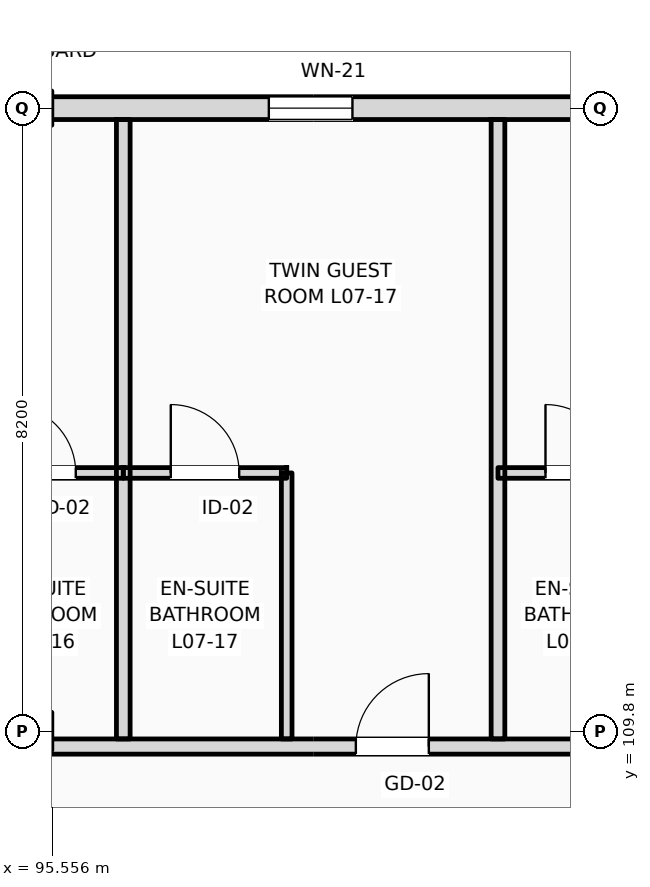
"""IFC4 building model, lengths in metres.
Left out: names, types, materials, properties, quantities, classifications, styles, units other than length and angle.
Written with IfcOpenShell. Run it as: python <this file> out.ifc"""

import sys

from ifc_helpers import new_model, si_unit, direction, frame, frame_2d, origin, place, context, subcontext, project, spatial, rectangle, extrude, element, fill, save


model = new_model("IFC4")
c1 = context("Model", 3, precision=1e-05, world=origin(), true_north=direction((0.0, 1.0)))
c2 = subcontext(c1, "Body", "Model", "MODEL_VIEW")
j1 = project(units=[si_unit("LENGTHUNIT", "METRE"), si_unit("PLANEANGLEUNIT", "RADIAN")], contexts=[c1])
p1 = place(None, origin())
s1 = spatial("IfcSite", under=j1, at=p1, CompositionType="ELEMENT")
p2 = place(p1, origin())
s2 = spatial("IfcBuilding", under=s1, at=p2, CompositionType="ELEMENT")
p3 = place(p2, frame((0.0, 0.0, 31.8)))
s3 = spatial("IfcBuildingStorey", under=s2, at=p3, CompositionType="ELEMENT", Elevation=31.8)
p4 = place(p3, frame((22.5, 118.0, 0.0), z_axis=(0.0, 0.0, 1.0), x_axis=(1.0, 0.0, 0.0)))
e1 = element("IfcWall", 1, at=p4, inside=s3, PredefinedType="STANDARD", context=c2, shape_type="SweptSolid", body=[
    extrude(rectangle(XDim=97.5, YDim=0.3, at=frame_2d((48.75, 0.0))), origin(), (0.0, 0.0, 1.0), 2.72),
])
p5 = place(p4, frame((3.61, 0.0, 0.9)))
e2 = element("IfcOpeningElement", 2, at=p5, cuts=e1, PredefinedType="OPENING", context=c2, shape_type="SweptSolid", body=[
    extrude(rectangle(XDim=1.1, YDim=1.64, at=frame_2d((0.55, 0.82))), frame((0.0, 0.16, 0.0), z_axis=(0.0, -1.0, 0.0), x_axis=(1.0, 0.0, 0.0)), (0.0, 0.0, 1.0), 0.32),
])
p6 = place(p4, frame((6.855, 0.0, 0.0)))
e3 = element("IfcOpeningElement", 3, at=p6, cuts=e1, PredefinedType="OPENING", context=c2, shape_type="SweptSolid", body=[
    extrude(rectangle(XDim=1.2, YDim=2.25, at=frame_2d((0.6, 1.125))), frame((0.0, 0.16, 0.0), z_axis=(0.0, -1.0, 0.0), x_axis=(1.0, 0.0, 0.0)), (0.0, 0.0, 1.0), 0.32),
])
p7 = place(p4, frame((11.405, 0.0, 0.9)))
e4 = element("IfcOpeningElement", 4, at=p7, cuts=e1, PredefinedType="OPENING", context=c2, shape_type="SweptSolid", body=[
    extrude(rectangle(XDim=2.1, YDim=1.64, at=frame_2d((1.05, 0.82))), frame((0.0, 0.16, 0.0), z_axis=(0.0, -1.0, 0.0), x_axis=(1.0, 0.0, 0.0)), (0.0, 0.0, 1.0), 0.32),
])
p8 = place(p4, frame((15.13, 0.0, 0.9)))
e5 = element("IfcOpeningElement", 5, at=p8, cuts=e1, PredefinedType="OPENING", context=c2, shape_type="SweptSolid", body=[
    extrude(rectangle(XDim=2.25, YDim=1.64, at=frame_2d((1.125, 0.82))), frame((0.0, 0.16, 0.0), z_axis=(0.0, -1.0, 0.0), x_axis=(1.0, 0.0, 0.0)), (0.0, 0.0, 1.0), 0.32),
])
p9 = place(p4, frame((21.53, 0.0, 0.0)))
e6 = element("IfcOpeningElement", 6, at=p9, cuts=e1, PredefinedType="OPENING", context=c2, shape_type="SweptSolid", body=[
    extrude(rectangle(XDim=1.2, YDim=2.25, at=frame_2d((0.6, 1.125))), frame((0.0, 0.16, 0.0), z_axis=(0.0, -1.0, 0.0), x_axis=(1.0, 0.0, 0.0)), (0.0, 0.0, 1.0), 0.32),
])
p10 = place(p4, frame((24.18, 0.0, 0.9)))
e7 = element("IfcOpeningElement", 7, at=p10, cuts=e1, PredefinedType="OPENING", context=c2, shape_type="SweptSolid", body=[
    extrude(rectangle(XDim=1.1, YDim=1.64, at=frame_2d((0.55, 0.82))), frame((0.0, 0.16, 0.0), z_axis=(0.0, -1.0, 0.0), x_axis=(1.0, 0.0, 0.0)), (0.0, 0.0, 1.0), 0.32),
])
p11 = place(p4, frame((29.105, 0.0, 0.9)))
e8 = element("IfcOpeningElement", 8, at=p11, cuts=e1, PredefinedType="OPENING", context=c2, shape_type="SweptSolid", body=[
    extrude(rectangle(XDim=2.7, YDim=1.64, at=frame_2d((1.35, 0.82))), frame((0.0, 0.16, 0.0), z_axis=(0.0, -1.0, 0.0), x_axis=(1.0, 0.0, 0.0)), (0.0, 0.0, 1.0), 0.32),
])
p12 = place(p4, frame((34.83, 0.0, 0.9)))
e9 = element("IfcOpeningElement", 9, at=p12, cuts=e1, PredefinedType="OPENING", context=c2, shape_type="SweptSolid", body=[
    extrude(rectangle(XDim=1.8, YDim=1.64, at=frame_2d((0.9, 0.82))), frame((0.0, 0.16, 0.0), z_axis=(0.0, -1.0, 0.0), x_axis=(1.0, 0.0, 0.0)), (0.0, 0.0, 1.0), 0.32),
])
p13 = place(p4, frame((38.525, 0.0, 0.0)))
e10 = element("IfcOpeningElement", 10, at=p13, cuts=e1, PredefinedType="OPENING", context=c2, shape_type="SweptSolid", body=[
    extrude(rectangle(XDim=1.2, YDim=2.25, at=frame_2d((0.6, 1.125))), frame((0.0, 0.16, 0.0), z_axis=(0.0, -1.0, 0.0), x_axis=(1.0, 0.0, 0.0)), (0.0, 0.0, 1.0), 0.32),
])
p14 = place(p4, frame((42.73, 0.0, 0.9)))
e11 = element("IfcOpeningElement", 11, at=p14, cuts=e1, PredefinedType="OPENING", context=c2, shape_type="SweptSolid", body=[
    extrude(rectangle(XDim=3.05, YDim=1.64, at=frame_2d((1.525, 0.82))), frame((0.0, 0.16, 0.0), z_axis=(0.0, -1.0, 0.0), x_axis=(1.0, 0.0, 0.0)), (0.0, 0.0, 1.0), 0.32),
])
p15 = place(p4, frame((47.155, 0.0, 0.9)))
e12 = element("IfcOpeningElement", 12, at=p15, cuts=e1, PredefinedType="OPENING", context=c2, shape_type="SweptSolid", body=[
    extrude(rectangle(XDim=1.35, YDim=1.64, at=frame_2d((0.675, 0.82))), frame((0.0, 0.16, 0.0), z_axis=(0.0, -1.0, 0.0), x_axis=(1.0, 0.0, 0.0)), (0.0, 0.0, 1.0), 0.32),
])
p16 = place(p4, frame((53.065, 0.0, 0.0)))
e13 = element("IfcOpeningElement", 13, at=p16, cuts=e1, PredefinedType="OPENING", context=c2, shape_type="SweptSolid", body=[
    extrude(rectangle(XDim=1.2, YDim=2.25, at=frame_2d((0.6, 1.125))), frame((0.0, 0.16, 0.0), z_axis=(0.0, -1.0, 0.0), x_axis=(1.0, 0.0, 0.0)), (0.0, 0.0, 1.0), 0.32),
])
p17 = place(p4, frame((58.2, 0.0, 0.9)))
e14 = element("IfcOpeningElement", 14, at=p17, cuts=e1, PredefinedType="OPENING", context=c2, shape_type="SweptSolid", body=[
    extrude(rectangle(XDim=1.8, YDim=1.64, at=frame_2d((0.9, 0.82))), frame((0.0, 0.16, 0.0), z_axis=(0.0, -1.0, 0.0), x_axis=(1.0, 0.0, 0.0)), (0.0, 0.0, 1.0), 0.32),
])
p18 = place(p4, frame((61.13, 0.0, 0.9)))
e15 = element("IfcOpeningElement", 15, at=p18, cuts=e1, PredefinedType="OPENING", context=c2, shape_type="SweptSolid", body=[
    extrude(rectangle(XDim=3.05, YDim=1.64, at=frame_2d((1.525, 0.82))), frame((0.0, 0.16, 0.0), z_axis=(0.0, -1.0, 0.0), x_axis=(1.0, 0.0, 0.0)), (0.0, 0.0, 1.0), 0.32),
])
p19 = place(p4, frame((67.93, 0.0, 0.0)))
e16 = element("IfcOpeningElement", 16, at=p19, cuts=e1, PredefinedType="OPENING", context=c2, shape_type="SweptSolid", body=[
    extrude(rectangle(XDim=1.2, YDim=2.25, at=frame_2d((0.6, 1.125))), frame((0.0, 0.16, 0.0), z_axis=(0.0, -1.0, 0.0), x_axis=(1.0, 0.0, 0.0)), (0.0, 0.0, 1.0), 0.32),
])
p20 = place(p4, frame((70.39, 0.0, 0.0)))
e17 = element("IfcOpeningElement", 17, at=p20, cuts=e1, PredefinedType="OPENING", context=c2, shape_type="SweptSolid", body=[
    extrude(rectangle(XDim=1.2, YDim=2.25, at=frame_2d((0.6, 1.125))), frame((0.0, 0.16, 0.0), z_axis=(0.0, -1.0, 0.0), x_axis=(1.0, 0.0, 0.0)), (0.0, 0.0, 1.0), 0.32),
])
p21 = place(p4, frame((75.905, 0.0, 0.9)))
e18 = element("IfcOpeningElement", 18, at=p21, cuts=e1, PredefinedType="OPENING", context=c2, shape_type="SweptSolid", body=[
    extrude(rectangle(XDim=1.1, YDim=1.5, at=frame_2d((0.55, 0.75))), frame((0.0, 0.16, 0.0), z_axis=(0.0, -1.0, 0.0), x_axis=(1.0, 0.0, 0.0)), (0.0, 0.0, 1.0), 0.32),
])
p22 = place(p4, frame((81.63, 0.0, 0.9)))
e19 = element("IfcOpeningElement", 19, at=p22, cuts=e1, PredefinedType="OPENING", context=c2, shape_type="SweptSolid", body=[
    extrude(rectangle(XDim=1.1, YDim=1.6, at=frame_2d((0.55, 0.8))), frame((0.0, 0.16, 0.0), z_axis=(0.0, -1.0, 0.0), x_axis=(1.0, 0.0, 0.0)), (0.0, 0.0, 1.0), 0.32),
])
p23 = place(p4, frame((84.955, 0.0, 0.9)))
e20 = element("IfcOpeningElement", 20, at=p23, cuts=e1, PredefinedType="OPENING", context=c2, shape_type="SweptSolid", body=[
    extrude(rectangle(XDim=1.4, YDim=1.64, at=frame_2d((0.7, 0.82))), frame((0.0, 0.16, 0.0), z_axis=(0.0, -1.0, 0.0), x_axis=(1.0, 0.0, 0.0)), (0.0, 0.0, 1.0), 0.32),
])
p24 = place(p4, frame((90.055, 0.0, 0.9)))
e21 = element("IfcOpeningElement", 21, at=p24, cuts=e1, PredefinedType="OPENING", context=c2, shape_type="SweptSolid", body=[
    extrude(rectangle(XDim=1.6, YDim=1.64, at=frame_2d((0.8, 0.82))), frame((0.0, 0.16, 0.0), z_axis=(0.0, -1.0, 0.0), x_axis=(1.0, 0.0, 0.0)), (0.0, 0.0, 1.0), 0.32),
])
p25 = place(p4, frame((93.87, 0.0, 0.9)))
e22 = element("IfcOpeningElement", 22, at=p25, cuts=e1, PredefinedType="OPENING", context=c2, shape_type="SweptSolid", body=[
    extrude(rectangle(XDim=1.75, YDim=1.64, at=frame_2d((0.875, 0.82))), frame((0.0, 0.16, 0.0), z_axis=(0.0, -1.0, 0.0), x_axis=(1.0, 0.0, 0.0)), (0.0, 0.0, 1.0), 0.32),
])
p26 = place(p3, frame((10.65, 109.6, 0.0), z_axis=(0.0, 0.0, 1.0), x_axis=(1.0, 0.0, 0.0)))
e23 = element("IfcWall", 23, at=p26, inside=s3, PredefinedType="PARTITIONING", context=c2, shape_type="SweptSolid", body=[
    extrude(rectangle(XDim=109.21, YDim=0.2, at=frame_2d((54.605, 0.0))), origin(), (0.0, 0.0, 1.0), 2.72),
])
p27 = place(p26, frame((15.825, 0.0, 0.0)))
e24 = element("IfcOpeningElement", 24, at=p27, cuts=e23, PredefinedType="OPENING", context=c2, shape_type="SweptSolid", body=[
    extrude(rectangle(XDim=1.02, YDim=2.2, at=frame_2d((0.51, 1.1))), frame((0.0, 0.11, 0.0), z_axis=(0.0, -1.0, 0.0), x_axis=(1.0, 0.0, 0.0)), (0.0, 0.0, 1.0), 0.22),
])
p28 = place(p26, frame((19.87, 0.0, 0.0)))
e25 = element("IfcOpeningElement", 25, at=p28, cuts=e23, PredefinedType="OPENING", context=c2, shape_type="SweptSolid", body=[
    extrude(rectangle(XDim=1.02, YDim=2.2, at=frame_2d((0.51, 1.1))), frame((0.0, 0.11, 0.0), z_axis=(0.0, -1.0, 0.0), x_axis=(1.0, 0.0, 0.0)), (0.0, 0.0, 1.0), 0.22),
])
p29 = place(p26, frame((24.47, 0.0, 0.0)))
e26 = element("IfcOpeningElement", 26, at=p29, cuts=e23, PredefinedType="OPENING", context=c2, shape_type="SweptSolid", body=[
    extrude(rectangle(XDim=1.02, YDim=2.2, at=frame_2d((0.51, 1.1))), frame((0.0, 0.11, 0.0), z_axis=(0.0, -1.0, 0.0), x_axis=(1.0, 0.0, 0.0)), (0.0, 0.0, 1.0), 0.22),
])
p30 = place(p26, frame((26.92, 0.0, 0.0)))
e27 = element("IfcOpeningElement", 27, at=p30, cuts=e23, PredefinedType="OPENING", context=c2, shape_type="SweptSolid", body=[
    extrude(rectangle(XDim=1.02, YDim=2.2, at=frame_2d((0.51, 1.1))), frame((0.0, 0.11, 0.0), z_axis=(0.0, -1.0, 0.0), x_axis=(1.0, 0.0, 0.0)), (0.0, 0.0, 1.0), 0.22),
])
p31 = place(p26, frame((33.7, 0.0, 0.0)))
e28 = element("IfcOpeningElement", 28, at=p31, cuts=e23, PredefinedType="OPENING", context=c2, shape_type="SweptSolid", body=[
    extrude(rectangle(XDim=0.96, YDim=2.2, at=frame_2d((0.48, 1.1))), frame((0.0, 0.11, 0.0), z_axis=(0.0, -1.0, 0.0), x_axis=(1.0, 0.0, 0.0)), (0.0, 0.0, 1.0), 0.22),
])
p32 = place(p26, frame((35.9, 0.0, 0.0)))
e29 = element("IfcOpeningElement", 29, at=p32, cuts=e23, PredefinedType="OPENING", context=c2, shape_type="SweptSolid", body=[
    extrude(rectangle(XDim=0.96, YDim=2.2, at=frame_2d((0.48, 1.1))), frame((0.0, 0.11, 0.0), z_axis=(0.0, -1.0, 0.0), x_axis=(1.0, 0.0, 0.0)), (0.0, 0.0, 1.0), 0.22),
])
p33 = place(p26, frame((42.9, 0.0, 0.0)))
e30 = element("IfcOpeningElement", 30, at=p33, cuts=e23, PredefinedType="OPENING", context=c2, shape_type="SweptSolid", body=[
    extrude(rectangle(XDim=0.96, YDim=2.2, at=frame_2d((0.48, 1.1))), frame((0.0, 0.11, 0.0), z_axis=(0.0, -1.0, 0.0), x_axis=(1.0, 0.0, 0.0)), (0.0, 0.0, 1.0), 0.22),
])
p34 = place(p26, frame((47.5, 0.0, 0.0)))
e31 = element("IfcOpeningElement", 31, at=p34, cuts=e23, PredefinedType="OPENING", context=c2, shape_type="SweptSolid", body=[
    extrude(rectangle(XDim=0.96, YDim=2.2, at=frame_2d((0.48, 1.1))), frame((0.0, 0.11, 0.0), z_axis=(0.0, -1.0, 0.0), x_axis=(1.0, 0.0, 0.0)), (0.0, 0.0, 1.0), 0.22),
])
p35 = place(p26, frame((49.95, 0.0, 0.0)))
e32 = element("IfcOpeningElement", 32, at=p35, cuts=e23, PredefinedType="OPENING", context=c2, shape_type="SweptSolid", body=[
    extrude(rectangle(XDim=0.96, YDim=2.2, at=frame_2d((0.48, 1.1))), frame((0.0, 0.11, 0.0), z_axis=(0.0, -1.0, 0.0), x_axis=(1.0, 0.0, 0.0)), (0.0, 0.0, 1.0), 0.22),
])
p36 = place(p26, frame((56.7, 0.0, 0.0)))
e33 = element("IfcOpeningElement", 33, at=p36, cuts=e23, PredefinedType="OPENING", context=c2, shape_type="SweptSolid", body=[
    extrude(rectangle(XDim=0.96, YDim=2.2, at=frame_2d((0.48, 1.1))), frame((0.0, 0.11, 0.0), z_axis=(0.0, -1.0, 0.0), x_axis=(1.0, 0.0, 0.0)), (0.0, 0.0, 1.0), 0.22),
])
p37 = place(p26, frame((59.15, 0.0, 0.0)))
e34 = element("IfcOpeningElement", 34, at=p37, cuts=e23, PredefinedType="OPENING", context=c2, shape_type="SweptSolid", body=[
    extrude(rectangle(XDim=0.96, YDim=2.2, at=frame_2d((0.48, 1.1))), frame((0.0, 0.11, 0.0), z_axis=(0.0, -1.0, 0.0), x_axis=(1.0, 0.0, 0.0)), (0.0, 0.0, 1.0), 0.22),
])
p38 = place(p26, frame((65.9, 0.0, 0.0)))
e35 = element("IfcOpeningElement", 35, at=p38, cuts=e23, PredefinedType="OPENING", context=c2, shape_type="SweptSolid", body=[
    extrude(rectangle(XDim=0.96, YDim=2.2, at=frame_2d((0.48, 1.1))), frame((0.0, 0.11, 0.0), z_axis=(0.0, -1.0, 0.0), x_axis=(1.0, 0.0, 0.0)), (0.0, 0.0, 1.0), 0.22),
])
p39 = place(p26, frame((70.5, 0.0, 0.0)))
e36 = element("IfcOpeningElement", 36, at=p39, cuts=e23, PredefinedType="OPENING", context=c2, shape_type="SweptSolid", body=[
    extrude(rectangle(XDim=0.96, YDim=2.2, at=frame_2d((0.48, 1.1))), frame((0.0, 0.11, 0.0), z_axis=(0.0, -1.0, 0.0), x_axis=(1.0, 0.0, 0.0)), (0.0, 0.0, 1.0), 0.22),
])
p40 = place(p26, frame((72.95, 0.0, 0.0)))
e37 = element("IfcOpeningElement", 37, at=p40, cuts=e23, PredefinedType="OPENING", context=c2, shape_type="SweptSolid", body=[
    extrude(rectangle(XDim=0.96, YDim=2.2, at=frame_2d((0.48, 1.1))), frame((0.0, 0.11, 0.0), z_axis=(0.0, -1.0, 0.0), x_axis=(1.0, 0.0, 0.0)), (0.0, 0.0, 1.0), 0.22),
])
p41 = place(p26, frame((79.7, 0.0, 0.0)))
e38 = element("IfcOpeningElement", 38, at=p41, cuts=e23, PredefinedType="OPENING", context=c2, shape_type="SweptSolid", body=[
    extrude(rectangle(XDim=0.96, YDim=2.2, at=frame_2d((0.48, 1.1))), frame((0.0, 0.11, 0.0), z_axis=(0.0, -1.0, 0.0), x_axis=(1.0, 0.0, 0.0)), (0.0, 0.0, 1.0), 0.22),
])
p42 = place(p26, frame((82.15, 0.0, 0.0)))
e39 = element("IfcOpeningElement", 39, at=p42, cuts=e23, PredefinedType="OPENING", context=c2, shape_type="SweptSolid", body=[
    extrude(rectangle(XDim=0.96, YDim=2.2, at=frame_2d((0.48, 1.1))), frame((0.0, 0.11, 0.0), z_axis=(0.0, -1.0, 0.0), x_axis=(1.0, 0.0, 0.0)), (0.0, 0.0, 1.0), 0.22),
])
p43 = place(p26, frame((88.9, 0.0, 0.0)))
e40 = element("IfcOpeningElement", 40, at=p43, cuts=e23, PredefinedType="OPENING", context=c2, shape_type="SweptSolid", body=[
    extrude(rectangle(XDim=0.96, YDim=2.2, at=frame_2d((0.48, 1.1))), frame((0.0, 0.11, 0.0), z_axis=(0.0, -1.0, 0.0), x_axis=(1.0, 0.0, 0.0)), (0.0, 0.0, 1.0), 0.22),
])
p44 = place(p26, frame((93.75, 0.0, 0.0)))
e41 = element("IfcOpeningElement", 41, at=p44, cuts=e23, PredefinedType="OPENING", context=c2, shape_type="SweptSolid", body=[
    extrude(rectangle(XDim=0.96, YDim=2.2, at=frame_2d((0.48, 1.1))), frame((0.0, 0.11, 0.0), z_axis=(0.0, -1.0, 0.0), x_axis=(1.0, 0.0, 0.0)), (0.0, 0.0, 1.0), 0.22),
])
p45 = place(p26, frame((98.1, 0.0, 0.0)))
e42 = element("IfcOpeningElement", 42, at=p45, cuts=e23, PredefinedType="OPENING", context=c2, shape_type="SweptSolid", body=[
    extrude(rectangle(XDim=0.96, YDim=2.2, at=frame_2d((0.48, 1.1))), frame((0.0, 0.11, 0.0), z_axis=(0.0, -1.0, 0.0), x_axis=(1.0, 0.0, 0.0)), (0.0, 0.0, 1.0), 0.22),
])
p46 = place(p26, frame((102.7, 0.0, 0.0)))
e43 = element("IfcOpeningElement", 43, at=p46, cuts=e23, PredefinedType="OPENING", context=c2, shape_type="SweptSolid", body=[
    extrude(rectangle(XDim=0.96, YDim=2.2, at=frame_2d((0.48, 1.1))), frame((0.0, 0.11, 0.0), z_axis=(0.0, -1.0, 0.0), x_axis=(1.0, 0.0, 0.0)), (0.0, 0.0, 1.0), 0.22),
])
p47 = place(p26, frame((105.04, 0.0, 0.0)))
e44 = element("IfcOpeningElement", 44, at=p47, cuts=e23, PredefinedType="OPENING", context=c2, shape_type="SweptSolid", body=[
    extrude(rectangle(XDim=0.96, YDim=2.2, at=frame_2d((0.48, 1.1))), frame((0.0, 0.11, 0.0), z_axis=(0.0, -1.0, 0.0), x_axis=(1.0, 0.0, 0.0)), (0.0, 0.0, 1.0), 0.22),
])
p48 = place(p26, frame((2.716, 0.0, 0.0)))
e45 = element("IfcOpeningElement", 45, at=p48, cuts=e23, PredefinedType="OPENING", context=c2, shape_type="SweptSolid", body=[
    extrude(rectangle(XDim=1.35, YDim=2.25, at=frame_2d((0.675, 1.125))), frame((0.0, 0.11, 0.0), z_axis=(0.0, -1.0, 0.0), x_axis=(1.0, 0.0, 0.0)), (0.0, 0.0, 1.0), 0.22),
])
p49 = place(p26, frame((6.65, 0.0, 0.0)))
e46 = element("IfcOpeningElement", 46, at=p49, cuts=e23, PredefinedType="OPENING", context=c2, shape_type="SweptSolid", body=[
    extrude(rectangle(XDim=1.35, YDim=2.25, at=frame_2d((0.675, 1.125))), frame((0.0, 0.11, 0.0), z_axis=(0.0, -1.0, 0.0), x_axis=(1.0, 0.0, 0.0)), (0.0, 0.0, 1.0), 0.22),
])
p50 = place(p26, frame((10.583, 0.0, 0.0)))
e47 = element("IfcOpeningElement", 47, at=p50, cuts=e23, PredefinedType="OPENING", context=c2, shape_type="SweptSolid", body=[
    extrude(rectangle(XDim=1.35, YDim=2.25, at=frame_2d((0.675, 1.125))), frame((0.0, 0.11, 0.0), z_axis=(0.0, -1.0, 0.0), x_axis=(1.0, 0.0, 0.0)), (0.0, 0.0, 1.0), 0.22),
])
p51 = place(p3, frame((96.49, 109.7, 0.0), z_axis=(0.0, 0.0, 1.0), x_axis=(0.0, 1.0, 0.0)))
e48 = element("IfcWall", 48, at=p51, inside=s3, PredefinedType="PARTITIONING", context=c2, shape_type="SweptSolid", body=[
    extrude(rectangle(XDim=8.15, YDim=0.18, at=frame_2d((4.075, 0.0))), origin(), (0.0, 0.0, 1.0), 3.36),
])
p52 = place(p3, frame((94.34, 113.2, 0.0), z_axis=(0.0, 0.0, 1.0), x_axis=(1.0, 0.0, 0.0)))
e49 = element("IfcWall", 49, at=p52, inside=s3, PredefinedType="PARTITIONING", context=c2, shape_type="SweptSolid", body=[
    extrude(rectangle(XDim=2.15, YDim=0.14, at=frame_2d((1.075, 0.0))), origin(), (0.0, 0.0, 1.0), 3.36),
])
p53 = place(p52, frame((0.625, 0.0, 0.0)))
e50 = element("IfcOpeningElement", 50, at=p53, cuts=e49, PredefinedType="OPENING", context=c2, shape_type="SweptSolid", body=[
    extrude(rectangle(XDim=0.9, YDim=2.1, at=frame_2d((0.45, 1.05))), frame((0.0, 0.08, 0.0), z_axis=(0.0, -1.0, 0.0), x_axis=(1.0, 0.0, 0.0)), (0.0, 0.0, 1.0), 0.16),
])
p54 = place(p3, frame((101.42, 109.7, 0.0), z_axis=(0.0, 0.0, 1.0), x_axis=(0.0, 1.0, 0.0)))
e51 = element("IfcWall", 51, at=p54, inside=s3, PredefinedType="PARTITIONING", context=c2, shape_type="SweptSolid", body=[
    extrude(rectangle(XDim=8.15, YDim=0.18, at=frame_2d((4.075, 0.0))), origin(), (0.0, 0.0, 1.0), 3.36),
])
p55 = place(p3, frame((98.64, 109.7, 0.0), z_axis=(0.0, 0.0, 1.0), x_axis=(0.0, 1.0, 0.0)))
e52 = element("IfcWall", 52, at=p55, inside=s3, PredefinedType="PARTITIONING", context=c2, shape_type="SweptSolid", body=[
    extrude(rectangle(XDim=3.5, YDim=0.14, at=frame_2d((1.75, 0.0))), origin(), (0.0, 0.0, 1.0), 3.36),
])
p56 = place(p3, frame((96.49, 113.2, 0.0), z_axis=(0.0, 0.0, 1.0), x_axis=(1.0, 0.0, 0.0)))
e53 = element("IfcWall", 53, at=p56, inside=s3, PredefinedType="PARTITIONING", context=c2, shape_type="SweptSolid", body=[
    extrude(rectangle(XDim=2.15, YDim=0.14, at=frame_2d((1.075, 0.0))), origin(), (0.0, 0.0, 1.0), 3.36),
])
p57 = place(p56, frame((0.625, 0.0, 0.0)))
e54 = element("IfcOpeningElement", 54, at=p57, cuts=e53, PredefinedType="OPENING", context=c2, shape_type="SweptSolid", body=[
    extrude(rectangle(XDim=0.9, YDim=2.1, at=frame_2d((0.45, 1.05))), frame((0.0, 0.08, 0.0), z_axis=(0.0, -1.0, 0.0), x_axis=(1.0, 0.0, 0.0)), (0.0, 0.0, 1.0), 0.16),
])
p58 = place(p3, frame((101.42, 113.2, 0.0), z_axis=(0.0, 0.0, 1.0), x_axis=(1.0, 0.0, 0.0)))
e55 = element("IfcWall", 55, at=p58, inside=s3, PredefinedType="PARTITIONING", context=c2, shape_type="SweptSolid", body=[
    extrude(rectangle(XDim=2.15, YDim=0.14, at=frame_2d((1.075, 0.0))), origin(), (0.0, 0.0, 1.0), 3.36),
])
p59 = place(p58, frame((0.625, 0.0, 0.0)))
e56 = element("IfcOpeningElement", 56, at=p59, cuts=e55, PredefinedType="OPENING", context=c2, shape_type="SweptSolid", body=[
    extrude(rectangle(XDim=0.9, YDim=2.1, at=frame_2d((0.45, 1.05))), frame((0.0, 0.08, 0.0), z_axis=(0.0, -1.0, 0.0), x_axis=(1.0, 0.0, 0.0)), (0.0, 0.0, 1.0), 0.16),
])
p60 = place(p21, origin())
e57 = element("IfcWindow", 57, at=p60, inside=s3, PartitioningType="DOUBLE_PANEL_VERTICAL", PredefinedType="WINDOW", context=c2, shape_type="SweptSolid", body=[
    extrude(rectangle(XDim=1.1, YDim=1.5, at=frame_2d((0.55, 0.75))), frame((0.0, 0.03, 0.0), z_axis=(0.0, -1.0, 0.0), x_axis=(1.0, 0.0, 0.0)), (0.0, 0.0, 1.0), 0.06),
])
fill(e18, e57)
p61 = place(p53, origin())
e58 = element("IfcDoor", 58, at=p61, inside=s3, OperationType="SINGLE_SWING_LEFT", PredefinedType="DOOR", context=c2, shape_type="SweptSolid", body=[
    extrude(rectangle(XDim=0.9, YDim=2.1, at=frame_2d((0.45, 1.05))), frame((0.0, 0.025, 0.0), z_axis=(0.0, -1.0, 0.0), x_axis=(1.0, 0.0, 0.0)), (0.0, 0.0, 1.0), 0.05),
])
fill(e50, e58)
p62 = place(p43, origin())
e59 = element("IfcDoor", 59, at=p62, inside=s3, OperationType="SINGLE_SWING_RIGHT", PredefinedType="DOOR", context=c2, shape_type="SweptSolid", body=[
    extrude(rectangle(XDim=0.96, YDim=2.2, at=frame_2d((0.48, 1.1))), frame((0.0, 0.025, 0.0), z_axis=(0.0, -1.0, 0.0), x_axis=(1.0, 0.0, 0.0)), (0.0, 0.0, 1.0), 0.05),
])
fill(e40, e59)
p63 = place(p57, origin())
e60 = element("IfcDoor", 60, at=p63, inside=s3, OperationType="SINGLE_SWING_LEFT", PredefinedType="DOOR", context=c2, shape_type="SweptSolid", body=[
    extrude(rectangle(XDim=0.9, YDim=2.1, at=frame_2d((0.45, 1.05))), frame((0.0, 0.025, 0.0), z_axis=(0.0, -1.0, 0.0), x_axis=(1.0, 0.0, 0.0)), (0.0, 0.0, 1.0), 0.05),
])
fill(e54, e60)
p64 = place(p59, origin())
e61 = element("IfcDoor", 61, at=p64, inside=s3, OperationType="SINGLE_SWING_LEFT", PredefinedType="DOOR", context=c2, shape_type="SweptSolid", body=[
    extrude(rectangle(XDim=0.9, YDim=2.1, at=frame_2d((0.45, 1.05))), frame((0.0, 0.025, 0.0), z_axis=(0.0, -1.0, 0.0), x_axis=(1.0, 0.0, 0.0)), (0.0, 0.0, 1.0), 0.05),
])
fill(e56, e61)
save(model, sys.argv[1])
